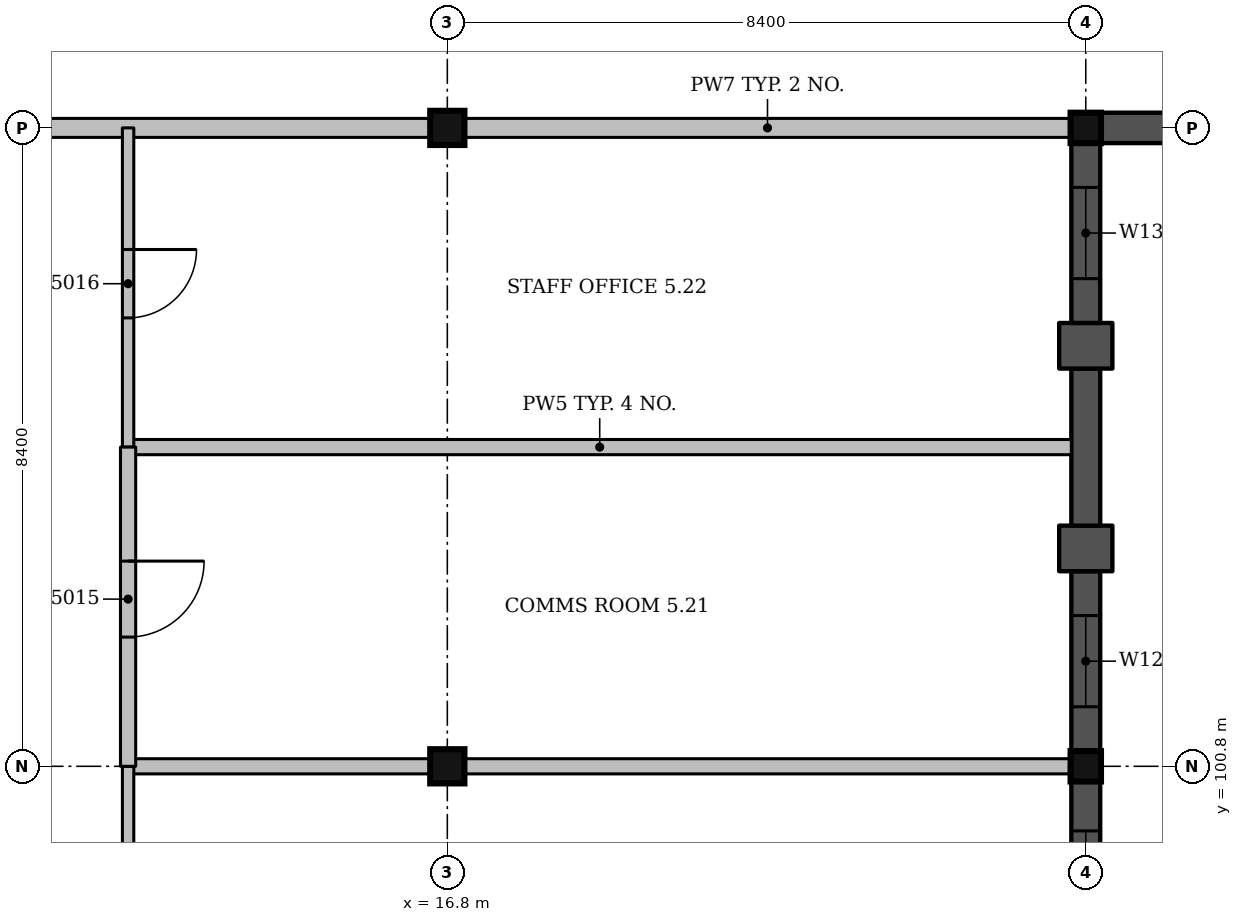
"""IFC4 building model, lengths in metres.
Left out: names, types, materials, properties, quantities, classifications, styles, units other than length and angle.
Written with IfcOpenShell. Run it as: python <this file> out.ifc"""

import sys

from ifc_helpers import new_model, si_unit, direction, frame, frame_2d, origin, origin_2d, place, context, subcontext, project, spatial, rectangle, extrude, element, fill, save


model = new_model("IFC4")
c1 = context("Model", 3, precision=1e-05, world=origin(), true_north=direction((0.0, 1.0)))
c2 = subcontext(c1, "Body", "Model", "MODEL_VIEW")
j1 = project(units=[si_unit("LENGTHUNIT", "METRE"), si_unit("PLANEANGLEUNIT", "RADIAN")], contexts=[c1])
p1 = place(None, origin())
s1 = spatial("IfcSite", under=j1, at=p1, CompositionType="ELEMENT")
p2 = place(p1, origin())
s2 = spatial("IfcBuilding", under=s1, at=p2, CompositionType="ELEMENT")
p3 = place(p2, frame((0.0, 0.0, 22.5)))
s3 = spatial("IfcBuildingStorey", under=s2, at=p3, CompositionType="ELEMENT", Elevation=22.5)
for number, where, z_axis, x_axis in (
    (1, (16.8, 100.8, 0.0), (0.0, 0.0, 1.0), (1.0, 0.0, 0.0)),
    (2, (16.8, 109.2, 0.0), (0.0, 0.0, 1.0), (1.0, 0.0, 0.0)),
):
    element("IfcColumn", number, at=place(p3, frame(where, z_axis=z_axis, x_axis=x_axis)), inside=s3, PredefinedType="COLUMN", context=c2, shape_type="SweptSolid", body=[
        extrude(rectangle(XDim=0.45, YDim=0.45, at=origin_2d()), origin(), (0.0, 0.0, 1.0), 4.5),
    ])
for number, where, z_axis, x_axis in (
    (3, (25.2, 100.8, 0.0), (0.0, 0.0, 1.0), (1.0, 0.0, 0.0)),
    (4, (25.2, 109.2, 0.0), (0.0, 0.0, 1.0), (1.0, 0.0, 0.0)),
):
    element("IfcColumn", number, at=place(p3, frame(where, z_axis=z_axis, x_axis=x_axis)), inside=s3, PredefinedType="COLUMN", context=c2, shape_type="SweptSolid", body=[
        extrude(rectangle(XDim=0.4, YDim=0.4, at=origin_2d()), origin(), (0.0, 0.0, 1.0), 4.5),
    ])
p4 = place(p3, frame((25.2, 96.9, 0.0), z_axis=(0.0, 0.0, 1.0), x_axis=(0.0, 1.0, 0.0)))
e5 = element("IfcWall", 5, at=p4, inside=s3, PredefinedType="SOLIDWALL", context=c2, shape_type="SweptSolid", body=[
    extrude(rectangle(XDim=3.7, YDim=0.38, at=frame_2d((1.85, 0.0))), origin(), (0.0, 0.0, 1.0), 3.35),
])
p5 = place(p4, frame((0.65, 0.0, 1.2)))
e6 = element("IfcOpeningElement", 6, at=p5, cuts=e5, PredefinedType="OPENING", context=c2, shape_type="SweptSolid", body=[
    extrude(rectangle(XDim=2.4, YDim=1.5, at=frame_2d((1.2, 0.75))), frame((0.0, 0.2, 0.0), z_axis=(0.0, -1.0, 0.0), x_axis=(1.0, 0.0, 0.0)), (0.0, 0.0, 1.0), 0.4),
])
p6 = place(p3, frame((25.2, 101.0, 0.0), z_axis=(0.0, 0.0, 1.0), x_axis=(0.0, 1.0, 0.0)))
e7 = element("IfcWall", 7, at=p6, inside=s3, PredefinedType="SOLIDWALL", context=c2, shape_type="SweptSolid", body=[
    extrude(rectangle(XDim=2.367, YDim=0.38, at=frame_2d((1.183, 0.0))), origin(), (0.0, 0.0, 1.0), 3.35),
])
p7 = place(p6, frame((0.583, 0.0, 2.4)))
e8 = element("IfcOpeningElement", 8, at=p7, cuts=e7, PredefinedType="OPENING", context=c2, shape_type="SweptSolid", body=[
    extrude(rectangle(XDim=1.2, YDim=0.6, at=frame_2d((0.6, 0.3))), frame((0.0, 0.2, 0.0), z_axis=(0.0, -1.0, 0.0), x_axis=(1.0, 0.0, 0.0)), (0.0, 0.0, 1.0), 0.4),
])
p8 = place(p3, frame((25.2, 103.367, 0.0), z_axis=(0.0, 0.0, 1.0), x_axis=(0.0, 1.0, 0.0)))
e9 = element("IfcWall", 9, at=p8, inside=s3, PredefinedType="SOLIDWALL", context=c2, shape_type="SweptSolid", body=[
    extrude(rectangle(XDim=0.6, YDim=0.7, at=frame_2d((0.3, 0.0))), origin(), (0.0, 0.0, 1.0), 3.35),
])
p9 = place(p3, frame((25.2, 103.967, 0.0), z_axis=(0.0, 0.0, 1.0), x_axis=(0.0, 1.0, 0.0)))
e10 = element("IfcWall", 10, at=p9, inside=s3, PredefinedType="SOLIDWALL", context=c2, shape_type="SweptSolid", body=[
    extrude(rectangle(XDim=2.066, YDim=0.38, at=frame_2d((1.033, 0.0))), origin(), (0.0, 0.0, 1.0), 3.35),
])
p10 = place(p3, frame((25.2, 106.033, 0.0), z_axis=(0.0, 0.0, 1.0), x_axis=(0.0, 1.0, 0.0)))
e11 = element("IfcWall", 11, at=p10, inside=s3, PredefinedType="SOLIDWALL", context=c2, shape_type="SweptSolid", body=[
    extrude(rectangle(XDim=0.6, YDim=0.7, at=frame_2d((0.3, 0.0))), origin(), (0.0, 0.0, 1.0), 3.35),
])
p11 = place(p3, frame((25.2, 106.633, 0.0), z_axis=(0.0, 0.0, 1.0), x_axis=(0.0, 1.0, 0.0)))
e12 = element("IfcWall", 12, at=p11, inside=s3, PredefinedType="SOLIDWALL", context=c2, shape_type="SweptSolid", body=[
    extrude(rectangle(XDim=2.367, YDim=0.38, at=frame_2d((1.183, 0.0))), origin(), (0.0, 0.0, 1.0), 3.35),
])
p12 = place(p11, frame((0.583, 0.0, 0.9)))
e13 = element("IfcOpeningElement", 13, at=p12, cuts=e12, PredefinedType="OPENING", context=c2, shape_type="SweptSolid", body=[
    extrude(rectangle(XDim=1.2, YDim=2.1, at=frame_2d((0.6, 1.05))), frame((0.0, 0.2, 0.0), z_axis=(0.0, -1.0, 0.0), x_axis=(1.0, 0.0, 0.0)), (0.0, 0.0, 1.0), 0.4),
])
p13 = place(p3, frame((25.4, 109.2, 0.0), z_axis=(0.0, 0.0, 1.0), x_axis=(1.0, 0.0, 0.0)))
e14 = element("IfcWall", 14, at=p13, inside=s3, PredefinedType="SOLIDWALL", context=c2, shape_type="SweptSolid", body=[
    extrude(rectangle(XDim=2.607, YDim=0.4, at=frame_2d((1.303, 0.0))), origin(), (0.0, 0.0, 1.0), 4.2),
])
p14 = place(p3, frame((12.6, 100.8, 0.0), z_axis=(0.0, 0.0, 1.0), x_axis=(1.0, 0.0, 0.0)))
e15 = element("IfcWall", 15, at=p14, inside=s3, PredefinedType="PARTITIONING", context=c2, shape_type="SweptSolid", body=[
    extrude(rectangle(XDim=3.975, YDim=0.2, at=frame_2d((1.987, 0.0))), origin(), (0.0, 0.0, 1.0), 3.4),
])
p15 = place(p3, frame((17.025, 100.8, 0.0), z_axis=(0.0, 0.0, 1.0), x_axis=(1.0, 0.0, 0.0)))
e16 = element("IfcWall", 16, at=p15, inside=s3, PredefinedType="PARTITIONING", context=c2, shape_type="SweptSolid", body=[
    extrude(rectangle(XDim=7.975, YDim=0.2, at=frame_2d((3.988, 0.0))), origin(), (0.0, 0.0, 1.0), 3.35),
])
p16 = place(p3, frame((12.6, 105.0, 0.0), z_axis=(0.0, 0.0, 1.0), x_axis=(1.0, 0.0, 0.0)))
e17 = element("IfcWall", 17, at=p16, inside=s3, PredefinedType="PARTITIONING", context=c2, shape_type="SweptSolid", body=[
    extrude(rectangle(XDim=12.41, YDim=0.2, at=frame_2d((6.205, 0.0))), origin(), (0.0, 0.0, 1.0), 3.35),
])
p17 = place(p3, frame((8.625, 109.2, 0.0), z_axis=(0.0, 0.0, 1.0), x_axis=(1.0, 0.0, 0.0)))
e18 = element("IfcWall", 18, at=p17, inside=s3, PredefinedType="SOLIDWALL", context=c2, shape_type="SweptSolid", body=[
    extrude(rectangle(XDim=7.95, YDim=0.25, at=frame_2d((3.975, 0.0))), origin(), (0.0, 0.0, 1.0), 3.4),
])
p18 = place(p17, frame((0.3, 0.0, 0.0)))
e19 = element("IfcOpeningElement", 19, at=p18, cuts=e18, PredefinedType="OPENING", context=c2, shape_type="SweptSolid", body=[
    extrude(rectangle(XDim=1.8, YDim=2.1, at=frame_2d((0.9, 1.05))), frame((0.0, 0.135, 0.0), z_axis=(0.0, -1.0, 0.0), x_axis=(1.0, 0.0, 0.0)), (0.0, 0.0, 1.0), 0.27),
])
p19 = place(p3, frame((17.025, 109.2, 0.0), z_axis=(0.0, 0.0, 1.0), x_axis=(1.0, 0.0, 0.0)))
e20 = element("IfcWall", 20, at=p19, inside=s3, PredefinedType="SOLIDWALL", context=c2, shape_type="SweptSolid", body=[
    extrude(rectangle(XDim=7.975, YDim=0.25, at=frame_2d((3.988, 0.0))), origin(), (0.0, 0.0, 1.0), 3.35),
])
p20 = place(p3, frame((12.6, 84.0, 0.0), z_axis=(0.0, 0.0, 1.0), x_axis=(0.0, 1.0, 0.0)))
e21 = element("IfcWall", 21, at=p20, inside=s3, PredefinedType="PARTITIONING", context=c2, shape_type="SweptSolid", body=[
    extrude(rectangle(XDim=16.8, YDim=0.15, at=frame_2d((8.4, 0.0))), origin(), (0.0, 0.0, 1.0), 3.4),
])
p21 = place(p20, frame((3.8, 0.0, 0.0)))
e22 = element("IfcOpeningElement", 22, at=p21, cuts=e21, PredefinedType="OPENING", context=c2, shape_type="SweptSolid", body=[
    extrude(rectangle(XDim=0.9, YDim=2.1, at=frame_2d((0.45, 1.05))), frame((0.0, 0.085, 0.0), z_axis=(0.0, -1.0, 0.0), x_axis=(1.0, 0.0, 0.0)), (0.0, 0.0, 1.0), 0.17),
])
p22 = place(p20, frame((12.2, 0.0, 0.0)))
e23 = element("IfcOpeningElement", 23, at=p22, cuts=e21, PredefinedType="OPENING", context=c2, shape_type="SweptSolid", body=[
    extrude(rectangle(XDim=0.9, YDim=2.1, at=frame_2d((0.45, 1.05))), frame((0.0, 0.085, 0.0), z_axis=(0.0, -1.0, 0.0), x_axis=(1.0, 0.0, 0.0)), (0.0, 0.0, 1.0), 0.17),
])
p23 = place(p3, frame((12.6, 105.0, 0.0), z_axis=(0.0, 0.0, 1.0), x_axis=(0.0, 1.0, 0.0)))
e24 = element("IfcWall", 24, at=p23, inside=s3, PredefinedType="PARTITIONING", context=c2, shape_type="SweptSolid", body=[
    extrude(rectangle(XDim=4.2, YDim=0.15, at=frame_2d((2.1, 0.0))), origin(), (0.0, 0.0, 1.0), 4.15),
])
p24 = place(p23, frame((1.7, 0.0, 0.0)))
e25 = element("IfcOpeningElement", 25, at=p24, cuts=e24, PredefinedType="OPENING", context=c2, shape_type="SweptSolid", body=[
    extrude(rectangle(XDim=0.9, YDim=2.1, at=frame_2d((0.45, 1.05))), frame((0.0, 0.085, 0.0), z_axis=(0.0, -1.0, 0.0), x_axis=(1.0, 0.0, 0.0)), (0.0, 0.0, 1.0), 0.17),
])
p25 = place(p3, frame((12.6, 100.8, 0.0), z_axis=(0.0, 0.0, 1.0), x_axis=(0.0, 1.0, 0.0)))
e26 = element("IfcWall", 26, at=p25, inside=s3, PredefinedType="PARTITIONING", context=c2, shape_type="SweptSolid", body=[
    extrude(rectangle(XDim=4.2, YDim=0.2, at=frame_2d((2.1, 0.0))), origin(), (0.0, 0.0, 1.0), 3.4),
])
p26 = place(p25, frame((1.7, 0.0, 0.0)))
e27 = element("IfcOpeningElement", 27, at=p26, cuts=e26, PredefinedType="OPENING", context=c2, shape_type="SweptSolid", body=[
    extrude(rectangle(XDim=1.0, YDim=2.1, at=frame_2d((0.5, 1.05))), frame((0.0, 0.11, 0.0), z_axis=(0.0, -1.0, 0.0), x_axis=(1.0, 0.0, 0.0)), (0.0, 0.0, 1.0), 0.22),
])
p27 = place(p5, origin())
e28 = element("IfcWindow", 28, at=p27, inside=s3, PartitioningType="SINGLE_PANEL", PredefinedType="WINDOW", context=c2, shape_type="SweptSolid", body=[
    extrude(rectangle(XDim=2.4, YDim=1.5, at=frame_2d((1.2, 0.75))), frame((0.0, 0.15, 0.0), z_axis=(0.0, -1.0, 0.0), x_axis=(1.0, 0.0, 0.0)), (0.0, 0.0, 1.0), 0.06),
])
fill(e6, e28)
p28 = place(p7, origin())
e29 = element("IfcWindow", 29, at=p28, inside=s3, PartitioningType="SINGLE_PANEL", PredefinedType="WINDOW", context=c2, shape_type="SweptSolid", body=[
    extrude(rectangle(XDim=1.2, YDim=0.6, at=frame_2d((0.6, 0.3))), frame((0.0, 0.15, 0.0), z_axis=(0.0, -1.0, 0.0), x_axis=(1.0, 0.0, 0.0)), (0.0, 0.0, 1.0), 0.06),
])
fill(e8, e29)
p29 = place(p12, origin())
e30 = element("IfcWindow", 30, at=p29, inside=s3, PartitioningType="SINGLE_PANEL", PredefinedType="WINDOW", context=c2, shape_type="SweptSolid", body=[
    extrude(rectangle(XDim=1.2, YDim=2.1, at=frame_2d((0.6, 1.05))), frame((0.0, 0.15, 0.0), z_axis=(0.0, -1.0, 0.0), x_axis=(1.0, 0.0, 0.0)), (0.0, 0.0, 1.0), 0.06),
])
fill(e13, e30)
p30 = place(p26, origin())
e31 = element("IfcDoor", 31, at=p30, inside=s3, OperationType="SINGLE_SWING_RIGHT", PredefinedType="DOOR", context=c2, shape_type="SweptSolid", body=[
    extrude(rectangle(XDim=1.0, YDim=2.1, at=frame_2d((0.5, 1.05))), frame((0.0, 0.025, 0.0), z_axis=(0.0, -1.0, 0.0), x_axis=(1.0, 0.0, 0.0)), (0.0, 0.0, 1.0), 0.05),
])
fill(e27, e31)
p31 = place(p24, origin())
e32 = element("IfcDoor", 32, at=p31, inside=s3, OperationType="SINGLE_SWING_RIGHT", PredefinedType="DOOR", context=c2, shape_type="SweptSolid", body=[
    extrude(rectangle(XDim=0.9, YDim=2.1, at=frame_2d((0.45, 1.05))), frame((0.0, 0.025, 0.0), z_axis=(0.0, -1.0, 0.0), x_axis=(1.0, 0.0, 0.0)), (0.0, 0.0, 1.0), 0.05),
])
fill(e25, e32)
save(model, sys.argv[1])
